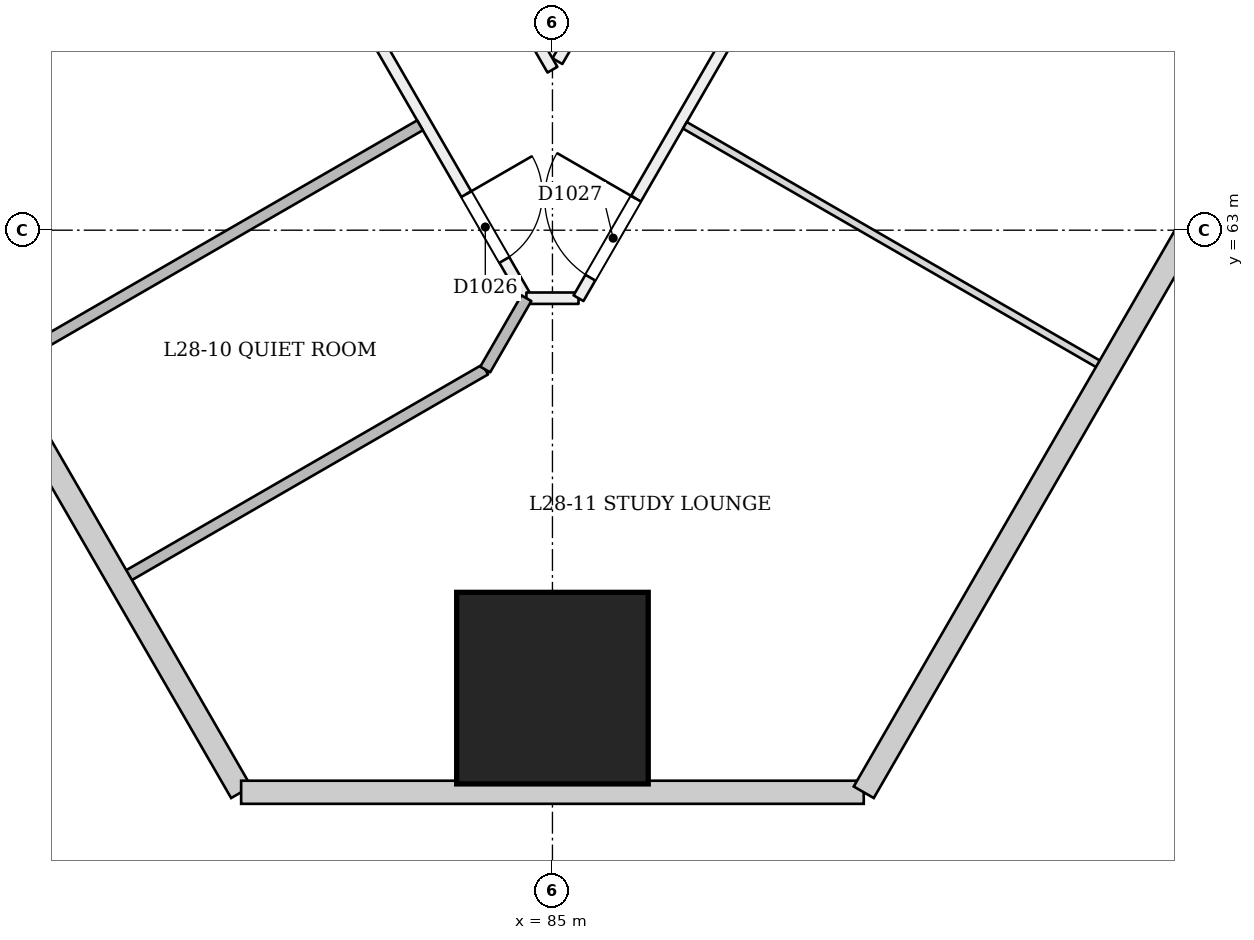
"""IFC4 building model, lengths in metres.
Left out: names, types, materials, properties, quantities, classifications, styles, units other than length and angle.
Written with IfcOpenShell. Run it as: python <this file> out.ifc"""

import sys

from ifc_helpers import new_model, si_unit, direction, frame, frame_2d, origin, origin_2d, place, context, subcontext, project, spatial, rectangle, extrude, element, fill, save


model = new_model("IFC4")
c1 = context("Model", 3, precision=1e-05, world=origin(), true_north=direction((0.0, 1.0)))
c2 = subcontext(c1, "Body", "Model", "MODEL_VIEW")
j1 = project(units=[si_unit("LENGTHUNIT", "METRE"), si_unit("PLANEANGLEUNIT", "RADIAN")], contexts=[c1])
p1 = place(None, origin())
s1 = spatial("IfcSite", under=j1, at=p1, CompositionType="ELEMENT")
p2 = place(p1, origin())
s2 = spatial("IfcBuilding", under=s1, at=p2, CompositionType="ELEMENT")
p3 = place(p2, frame((0.0, 0.0, 111.6)))
s3 = spatial("IfcBuildingStorey", under=s2, at=p3, CompositionType="ELEMENT", Elevation=111.6)
p4 = place(p3, frame((85.0, 56.906, 0.0), z_axis=(0.0, 0.058360852261, 0.998295552892), x_axis=(-1.0, 0.0, 0.0)))
e1 = element("IfcColumn", 1, at=p4, inside=s3, PredefinedType="COLUMN", context=c2, shape_type="SweptSolid", body=[
    extrude(rectangle(XDim=2.52, YDim=2.52, at=origin_2d()), origin(), (0.0, 0.0, 1.0), 3.606),
])
p5 = place(p3, frame((99.716, 90.6, 0.0), z_axis=(0.0, 0.0, 1.0), x_axis=(-0.500001331159, -0.866024635238, 0.0)))
e2 = element("IfcWall", 2, at=p5, inside=s3, PredefinedType="PARTITIONING", context=c2, shape_type="SweptSolid", body=[
    extrude(rectangle(XDim=29.302, YDim=0.15, at=frame_2d((14.651, 0.0))), origin(), (0.0, 0.0, 1.0), 3.1),
])
p6 = place(p5, frame((2.192, 0.0, 0.0)))
e3 = element("IfcOpeningElement", 3, at=p6, cuts=e2, PredefinedType="OPENING", context=c2, shape_type="SweptSolid", body=[
    extrude(rectangle(XDim=0.9, YDim=2.1, at=frame_2d((0.45, 1.05))), frame((0.0, 0.085, 0.0), z_axis=(0.0, -1.0, 0.0), x_axis=(1.0, 0.0, 0.0)), (0.0, 0.0, 1.0), 0.171),
])
p7 = place(p5, frame((5.182, 0.0, 0.0)))
e4 = element("IfcOpeningElement", 4, at=p7, cuts=e2, PredefinedType="OPENING", context=c2, shape_type="SweptSolid", body=[
    extrude(rectangle(XDim=0.9, YDim=2.1, at=frame_2d((0.45, 1.05))), frame((0.0, 0.085, 0.0), z_axis=(0.0, -1.0, 0.0), x_axis=(1.0, 0.0, 0.0)), (0.0, 0.0, 1.0), 0.171),
])
p8 = place(p5, frame((15.001, 0.0, 0.0)))
e5 = element("IfcOpeningElement", 5, at=p8, cuts=e2, PredefinedType="OPENING", context=c2, shape_type="SweptSolid", body=[
    extrude(rectangle(XDim=1.0, YDim=2.1, at=frame_2d((0.5, 1.05))), frame((0.0, 0.085, 0.0), z_axis=(0.0, -1.0, 0.0), x_axis=(1.0, 0.0, 0.0)), (0.0, 0.0, 1.0), 0.171),
])
p9 = place(p5, frame((18.236, 0.0, 0.0)))
e6 = element("IfcOpeningElement", 6, at=p9, cuts=e2, PredefinedType="OPENING", context=c2, shape_type="SweptSolid", body=[
    extrude(rectangle(XDim=1.0, YDim=2.1, at=frame_2d((0.5, 1.05))), frame((0.0, 0.085, 0.0), z_axis=(0.0, -1.0, 0.0), x_axis=(1.0, 0.0, 0.0)), (0.0, 0.0, 1.0), 0.171),
])
p10 = place(p5, frame((8.514, 0.0, 0.0)))
e7 = element("IfcOpeningElement", 7, at=p10, cuts=e2, PredefinedType="OPENING", context=c2, shape_type="SweptSolid", body=[
    extrude(rectangle(XDim=1.0, YDim=2.1, at=frame_2d((0.5, 1.05))), frame((0.0, 0.085, 0.0), z_axis=(0.0, -1.0, 0.0), x_axis=(1.0, 0.0, 0.0)), (0.0, 0.0, 1.0), 0.171),
])
p11 = place(p5, frame((11.823, 0.0, 0.0)))
e8 = element("IfcOpeningElement", 8, at=p11, cuts=e2, PredefinedType="OPENING", context=c2, shape_type="SweptSolid", body=[
    extrude(rectangle(XDim=1.0, YDim=2.1, at=frame_2d((0.5, 1.05))), frame((0.0, 0.085, 0.0), z_axis=(0.0, -1.0, 0.0), x_axis=(1.0, 0.0, 0.0)), (0.0, 0.0, 1.0), 0.171),
])
p12 = place(p5, frame((22.054, 0.0, 0.0)))
e9 = element("IfcOpeningElement", 9, at=p12, cuts=e2, PredefinedType="OPENING", context=c2, shape_type="SweptSolid", body=[
    extrude(rectangle(XDim=1.0, YDim=2.1, at=frame_2d((0.5, 1.05))), frame((0.0, 0.085, 0.0), z_axis=(0.0, -1.0, 0.0), x_axis=(1.0, 0.0, 0.0)), (0.0, 0.0, 1.0), 0.171),
])
p13 = place(p3, frame((85.0, 65.112, 0.0), z_axis=(0.0, 0.0, 1.0), x_axis=(-0.499994117932, 0.866028799771, 0.0)))
e10 = element("IfcWall", 10, at=p13, inside=s3, PredefinedType="PARTITIONING", context=c2, shape_type="SweptSolid", body=[
    extrude(rectangle(XDim=29.431, YDim=0.15, at=frame_2d((14.716, 0.0))), origin(), (0.0, 0.0, 1.0), 3.1),
])
p14 = place(p13, frame((2.874, 0.0, 0.0)))
e11 = element("IfcOpeningElement", 11, at=p14, cuts=e10, PredefinedType="OPENING", context=c2, shape_type="SweptSolid", body=[
    extrude(rectangle(XDim=1.0, YDim=2.1, at=frame_2d((0.5, 1.05))), frame((0.0, 0.085, 0.0), z_axis=(0.0, -1.0, 0.0), x_axis=(1.0, 0.0, 0.0)), (0.0, 0.0, 1.0), 0.171),
])
p15 = place(p13, frame((25.015, 0.0, 0.0)))
e12 = element("IfcOpeningElement", 12, at=p15, cuts=e10, PredefinedType="OPENING", context=c2, shape_type="SweptSolid", body=[
    extrude(rectangle(XDim=1.0, YDim=2.1, at=frame_2d((0.5, 1.05))), frame((0.0, 0.085, 0.0), z_axis=(0.0, -1.0, 0.0), x_axis=(1.0, 0.0, 0.0)), (0.0, 0.0, 1.0), 0.171),
])
p16 = place(p13, frame((12.586, 0.0, 0.0)))
e13 = element("IfcOpeningElement", 13, at=p16, cuts=e10, PredefinedType="OPENING", context=c2, shape_type="SweptSolid", body=[
    extrude(rectangle(XDim=1.0, YDim=2.1, at=frame_2d((0.5, 1.05))), frame((0.0, 0.085, 0.0), z_axis=(0.0, -1.0, 0.0), x_axis=(1.0, 0.0, 0.0)), (0.0, 0.0, 1.0), 0.171),
])
p17 = place(p13, frame((20.422, 0.0, 0.0)))
e14 = element("IfcOpeningElement", 14, at=p17, cuts=e10, PredefinedType="OPENING", context=c2, shape_type="SweptSolid", body=[
    extrude(rectangle(XDim=1.0, YDim=2.1, at=frame_2d((0.5, 1.05))), frame((0.0, 0.085, 0.0), z_axis=(0.0, -1.0, 0.0), x_axis=(1.0, 0.0, 0.0)), (0.0, 0.0, 1.0), 0.171),
])
p18 = place(p13, frame((16.093, 0.0, 0.0)))
e15 = element("IfcOpeningElement", 15, at=p18, cuts=e10, PredefinedType="OPENING", context=c2, shape_type="SweptSolid", body=[
    extrude(rectangle(XDim=1.0, YDim=2.1, at=frame_2d((0.5, 1.05))), frame((0.0, 0.085, 0.0), z_axis=(0.0, -1.0, 0.0), x_axis=(1.0, 0.0, 0.0)), (0.0, 0.0, 1.0), 0.171),
])
p19 = place(p13, frame((8.688, 0.0, 0.0)))
e16 = element("IfcOpeningElement", 16, at=p19, cuts=e10, PredefinedType="OPENING", context=c2, shape_type="SweptSolid", body=[
    extrude(rectangle(XDim=1.2, YDim=2.1, at=frame_2d((0.6, 1.05))), frame((0.0, 0.085, 0.0), z_axis=(0.0, -1.0, 0.0), x_axis=(1.0, 0.0, 0.0)), (0.0, 0.0, 1.0), 0.171),
])
p20 = place(p3, frame((63.988, 97.906, 0.0), z_axis=(0.0, 0.0, 1.0), x_axis=(0.500001579174, -0.866024492046, 0.0)))
e17 = element("IfcWall", 17, at=p20, inside=s3, PredefinedType="PARTITIONING", context=c2, shape_type="SweptSolid", body=[
    extrude(rectangle(XDim=41.339, YDim=0.15, at=frame_2d((20.669, 0.0))), origin(), (0.0, 0.0, 1.0), 2.7),
])
p21 = place(p20, frame((0.228, 0.0, 0.0)))
e18 = element("IfcOpeningElement", 18, at=p21, cuts=e17, PredefinedType="OPENING", context=c2, shape_type="SweptSolid", body=[
    extrude(rectangle(XDim=1.2, YDim=2.1, at=frame_2d((0.6, 1.05))), frame((0.0, 0.085, 0.0), z_axis=(0.0, -1.0, 0.0), x_axis=(1.0, 0.0, 0.0)), (0.0, 0.0, 1.0), 0.171),
])
p22 = place(p20, frame((11.07, 0.0, 0.0)))
e19 = element("IfcOpeningElement", 19, at=p22, cuts=e17, PredefinedType="OPENING", context=c2, shape_type="SweptSolid", body=[
    extrude(rectangle(XDim=1.2, YDim=2.1, at=frame_2d((0.6, 1.05))), frame((0.0, 0.085, 0.0), z_axis=(0.0, -1.0, 0.0), x_axis=(1.0, 0.0, 0.0)), (0.0, 0.0, 1.0), 0.171),
])
p23 = place(p20, frame((22.32, 0.0, 0.0)))
e20 = element("IfcOpeningElement", 20, at=p23, cuts=e17, PredefinedType="OPENING", context=c2, shape_type="SweptSolid", body=[
    extrude(rectangle(XDim=1.2, YDim=2.1, at=frame_2d((0.6, 1.05))), frame((0.0, 0.085, 0.0), z_axis=(0.0, -1.0, 0.0), x_axis=(1.0, 0.0, 0.0)), (0.0, 0.0, 1.0), 0.171),
])
p24 = place(p20, frame((32.47, 0.0, 0.0)))
e21 = element("IfcOpeningElement", 21, at=p24, cuts=e17, PredefinedType="OPENING", context=c2, shape_type="SweptSolid", body=[
    extrude(rectangle(XDim=1.2, YDim=2.1, at=frame_2d((0.6, 1.05))), frame((0.0, 0.085, 0.0), z_axis=(0.0, -1.0, 0.0), x_axis=(1.0, 0.0, 0.0)), (0.0, 0.0, 1.0), 0.171),
])
p25 = place(p20, frame((39.758, 0.0, 0.0)))
e22 = element("IfcOpeningElement", 22, at=p25, cuts=e17, PredefinedType="OPENING", context=c2, shape_type="SweptSolid", body=[
    extrude(rectangle(XDim=1.0, YDim=2.1, at=frame_2d((0.5, 1.05))), frame((0.0, 0.085, 0.0), z_axis=(0.0, -1.0, 0.0), x_axis=(1.0, 0.0, 0.0)), (0.0, 0.0, 1.0), 0.171),
])
p26 = place(p3, frame((84.657, 62.105, 0.0), z_axis=(0.0, 0.0, 1.0), x_axis=(1.0, 0.0, 0.0)))
e23 = element("IfcWall", 23, at=p26, inside=s3, PredefinedType="PARTITIONING", context=c2, shape_type="SweptSolid", body=[
    extrude(rectangle(XDim=0.686, YDim=0.15, at=frame_2d((0.343, 0.0))), origin(), (0.0, 0.0, 1.0), 3.1),
])
p27 = place(p3, frame((85.343, 62.105, 0.0), z_axis=(0.0, 0.0, 1.0), x_axis=(0.500001579174, 0.866024492046, 0.0)))
e24 = element("IfcWall", 24, at=p27, inside=s3, PredefinedType="PARTITIONING", context=c2, shape_type="SweptSolid", body=[
    extrude(rectangle(XDim=41.339, YDim=0.15, at=frame_2d((20.669, 0.0))), origin(), (0.0, 0.0, 1.0), 2.7),
])
p28 = place(p27, frame((0.312, 0.0, 0.0)))
e25 = element("IfcOpeningElement", 25, at=p28, cuts=e24, PredefinedType="OPENING", context=c2, shape_type="SweptSolid", body=[
    extrude(rectangle(XDim=1.2, YDim=2.1, at=frame_2d((0.6, 1.05))), frame((0.0, 0.085, 0.0), z_axis=(0.0, -1.0, 0.0), x_axis=(1.0, 0.0, 0.0)), (0.0, 0.0, 1.0), 0.171),
])
p29 = place(p27, frame((8.82, 0.0, 0.0)))
e26 = element("IfcOpeningElement", 26, at=p29, cuts=e24, PredefinedType="OPENING", context=c2, shape_type="SweptSolid", body=[
    extrude(rectangle(XDim=1.2, YDim=2.1, at=frame_2d((0.6, 1.05))), frame((0.0, 0.085, 0.0), z_axis=(0.0, -1.0, 0.0), x_axis=(1.0, 0.0, 0.0)), (0.0, 0.0, 1.0), 0.171),
])
p30 = place(p27, frame((22.32, 0.0, 0.0)))
e27 = element("IfcOpeningElement", 27, at=p30, cuts=e24, PredefinedType="OPENING", context=c2, shape_type="SweptSolid", body=[
    extrude(rectangle(XDim=1.2, YDim=2.1, at=frame_2d((0.6, 1.05))), frame((0.0, 0.085, 0.0), z_axis=(0.0, -1.0, 0.0), x_axis=(1.0, 0.0, 0.0)), (0.0, 0.0, 1.0), 0.171),
])
p31 = place(p27, frame((32.47, 0.0, 0.0)))
e28 = element("IfcOpeningElement", 28, at=p31, cuts=e24, PredefinedType="OPENING", context=c2, shape_type="SweptSolid", body=[
    extrude(rectangle(XDim=1.2, YDim=2.1, at=frame_2d((0.6, 1.05))), frame((0.0, 0.085, 0.0), z_axis=(0.0, -1.0, 0.0), x_axis=(1.0, 0.0, 0.0)), (0.0, 0.0, 1.0), 0.171),
])
p32 = place(p27, frame((39.739, 0.0, 0.0)))
e29 = element("IfcOpeningElement", 29, at=p32, cuts=e24, PredefinedType="OPENING", context=c2, shape_type="SweptSolid", body=[
    extrude(rectangle(XDim=1.0, YDim=2.1, at=frame_2d((0.5, 1.05))), frame((0.0, 0.085, 0.0), z_axis=(0.0, -1.0, 0.0), x_axis=(1.0, 0.0, 0.0)), (0.0, 0.0, 1.0), 0.171),
])
p33 = place(p3, frame((77.78, 61.217, 0.0), z_axis=(0.0, 0.0, 1.0), x_axis=(0.866015887322, 0.500016482634, 0.0)))
e30 = element("IfcWall", 30, at=p33, inside=s3, PredefinedType="PARTITIONING", context=c2, shape_type="SweptSolid", body=[
    extrude(rectangle(XDim=6.325, YDim=0.15, at=frame_2d((3.163, 0.0))), origin(), (0.0, 0.0, 1.0), 2.6),
])
p34 = place(p3, frame((79.385, 58.437, 0.0), z_axis=(0.0, 0.0, 1.0), x_axis=(0.86601735395, 0.500013942463, 0.0)))
e31 = element("IfcWall", 31, at=p34, inside=s3, PredefinedType="PARTITIONING", context=c2, shape_type="SweptSolid", body=[
    extrude(rectangle(XDim=5.462, YDim=0.15, at=frame_2d((2.731, 0.0))), origin(), (0.0, 0.0, 1.0), 2.6),
])
p35 = place(p3, frame((84.115, 61.167, 0.0), z_axis=(0.0, 0.0, 1.0), x_axis=(0.500138652881, 0.865945337706, 0.0)))
e32 = element("IfcWall", 32, at=p35, inside=s3, PredefinedType="PARTITIONING", context=c2, shape_type="SweptSolid", body=[
    extrude(rectangle(XDim=1.083, YDim=0.15, at=frame_2d((0.542, 0.0))), origin(), (0.0, 0.0, 1.0), 3.1),
])
p36 = place(p3, frame((92.22, 61.217, 0.0), z_axis=(0.0, 0.0, 1.0), x_axis=(-0.866015887322, 0.500016482634, 0.0)))
e33 = element("IfcWall", 33, at=p36, inside=s3, PredefinedType="PARTITIONING", context=c2, shape_type="SweptSolid", body=[
    extrude(rectangle(XDim=6.325, YDim=0.1, at=frame_2d((3.163, 0.0))), origin(), (0.0, 0.0, 1.0), 2.6),
])
p37 = place(p25, origin())
e34 = element("IfcDoor", 34, at=p37, inside=s3, OperationType="SINGLE_SWING_LEFT", PredefinedType="NOTDEFINED", context=c2, shape_type="SweptSolid", body=[
    extrude(rectangle(XDim=1.0, YDim=2.1, at=frame_2d((0.5, 1.05))), frame((0.0, 0.025, 0.0), z_axis=(0.0, -1.0, 0.0), x_axis=(1.0, 0.0, 0.0)), (0.0, 0.0, 1.0), 0.05),
])
fill(e22, e34)
p38 = place(p28, origin())
e35 = element("IfcDoor", 35, at=p38, inside=s3, OperationType="SINGLE_SWING_RIGHT", PredefinedType="NOTDEFINED", context=c2, shape_type="SweptSolid", body=[
    extrude(rectangle(XDim=1.2, YDim=2.1, at=frame_2d((0.6, 1.05))), frame((0.0, 0.025, 0.0), z_axis=(0.0, -1.0, 0.0), x_axis=(1.0, 0.0, 0.0)), (0.0, 0.0, 1.0), 0.05),
])
fill(e25, e35)
save(model, sys.argv[1])
